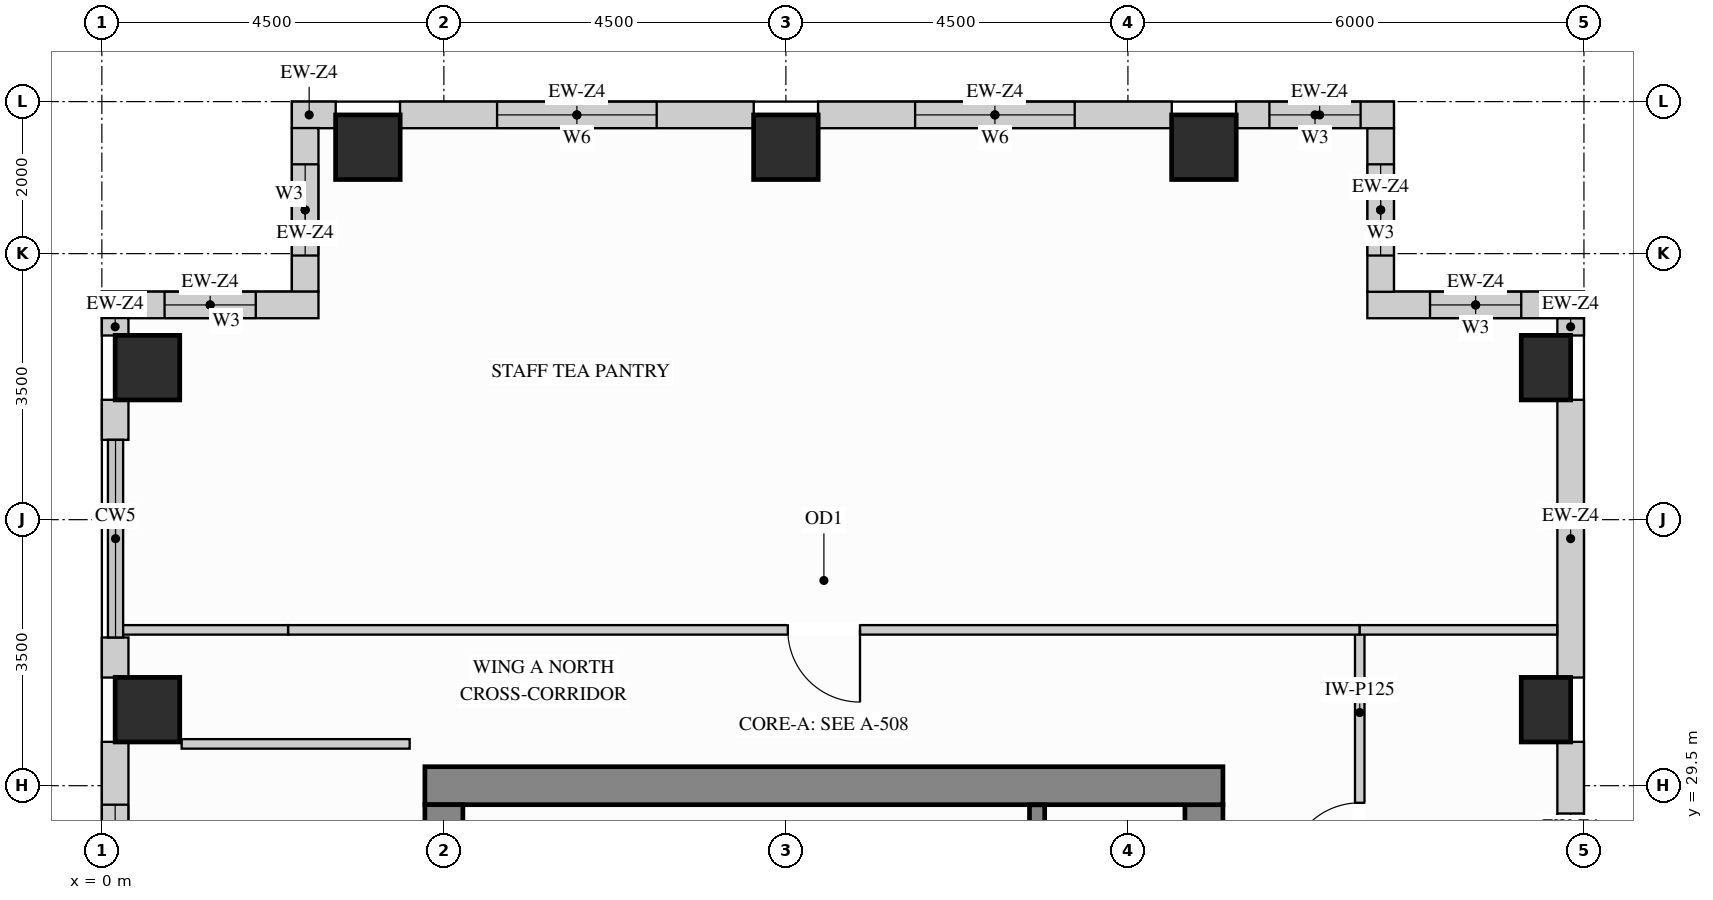
"""IFC4 building model, lengths in metres.
Left out: names, types, materials, properties, quantities, classifications, styles, units other than length and angle.
Written with IfcOpenShell. Run it as: python <this file> out.ifc"""

import sys

from ifc_helpers import new_model, si_unit, direction, frame, frame_2d, origin, origin_2d, place, context, subcontext, project, spatial, rectangle, extrude, source, transform, mapped, element, fill, save


model = new_model("IFC4")
c1 = context("Model", 3, precision=1e-05, world=origin(), true_north=direction((0.0, 1.0)))
c2 = subcontext(c1, "Body", "Model", "MODEL_VIEW")
j1 = project(units=[si_unit("LENGTHUNIT", "METRE"), si_unit("PLANEANGLEUNIT", "RADIAN")], contexts=[c1])
p1 = place(None, origin())
s1 = spatial("IfcSite", under=j1, at=p1, CompositionType="ELEMENT")
p2 = place(p1, origin())
s2 = spatial("IfcBuilding", under=s1, at=p2, CompositionType="ELEMENT")
p3 = place(p2, frame((0.0, 0.0, 255.6)))
s3 = spatial("IfcBuildingStorey", under=s2, at=p3, CompositionType="ELEMENT", Elevation=255.6)
m1 = source(origin(), c2, "Body", "SweptSolid", [
    extrude(rectangle(XDim=0.65, YDim=0.85, at=origin_2d()), origin(), (0.0, 0.0, 1.0), 3.4),
])
for number, where, z_axis, x_axis in (
    (1, (19.0, 30.5, 0.0), (0.0, 0.0, 1.0), (1.0, 0.0, 0.0)),
    (2, (19.0, 35.0, 0.0), (0.0, 0.0, 1.0), (1.0, 0.0, 0.0)),
):
    element("IfcColumn", number, at=place(p3, frame(where, z_axis=z_axis, x_axis=x_axis)), inside=s3, PredefinedType="COLUMN", context=c2, shape_type="MappedRepresentation", body=[
        mapped(m1, transform((0.0, 0.0, 0.0), x_axis=(1.0, 0.0, 0.0), y_axis=(0.0, 1.0, 0.0), z_axis=(0.0, 0.0, 1.0))),
    ])
m2 = source(origin(), c2, "Body", "SweptSolid", [
    extrude(rectangle(XDim=0.85, YDim=0.85, at=origin_2d()), origin(), (0.0, 0.0, 1.0), 3.4),
])
for number, where, z_axis, x_axis in (
    (3, (14.5, 37.9, 0.0), (0.0, 0.0, 1.0), (1.0, 0.0, 0.0)),
    (4, (3.5, 37.9, 0.0), (0.0, 0.0, 1.0), (1.0, 0.0, 0.0)),
    (5, (9.0, 37.9, 0.0), (0.0, 0.0, 1.0), (1.0, 0.0, 0.0)),
    (6, (0.6, 30.5, 0.0), (0.0, 0.0, 1.0), (1.0, 0.0, 0.0)),
    (7, (0.6, 35.0, 0.0), (0.0, 0.0, 1.0), (1.0, 0.0, 0.0)),
):
    element("IfcColumn", number, at=place(p3, frame(where, z_axis=z_axis, x_axis=x_axis)), inside=s3, PredefinedType="COLUMN", context=c2, shape_type="MappedRepresentation", body=[
        mapped(m2, transform((0.0, 0.0, 0.0), x_axis=(1.0, 0.0, 0.0), y_axis=(0.0, 1.0, 0.0), z_axis=(0.0, 0.0, 1.0))),
    ])
m3 = source(origin(), c2, "Body", "SweptSolid", [
    extrude(rectangle(XDim=8.37, YDim=0.5, at=frame_2d((4.185, 0.0))), origin(), (0.0, 0.0, 1.0), 3.4),
])
p4 = place(p3, frame((14.5, 20.88, 0.0), z_axis=(0.0, 0.0, 1.0), x_axis=(0.0, 1.0, 0.0)))
e8 = element("IfcWall", 8, at=p4, inside=s3, PredefinedType="SHEAR", context=c2, shape_type="MappedRepresentation", body=[
    mapped(m3, transform((0.0, 0.0, 0.0), x_axis=(1.0, 0.0, 0.0), y_axis=(0.0, 1.0, 0.0), z_axis=(0.0, 0.0, 1.0))),
])
m4 = source(origin(), c2, "Body", "SweptSolid", [
    extrude(rectangle(XDim=10.5, YDim=0.5, at=frame_2d((5.25, 0.0))), origin(), (0.0, 0.0, 1.0), 3.4),
])
p5 = place(p3, frame((4.25, 29.5, 0.0), z_axis=(0.0, 0.0, 1.0), x_axis=(1.0, 0.0, 0.0)))
e9 = element("IfcWall", 9, at=p5, inside=s3, PredefinedType="SHEAR", context=c2, shape_type="MappedRepresentation", body=[
    mapped(m4, transform((0.0, 0.0, 0.0), x_axis=(1.0, 0.0, 0.0), y_axis=(0.0, 1.0, 0.0), z_axis=(0.0, 0.0, 1.0))),
])
m5 = source(origin(), c2, "Body", "SweptSolid", [
    extrude(rectangle(XDim=20.5, YDim=0.5, at=frame_2d((10.25, 0.0))), origin(), (0.0, 0.0, 1.0), 3.4),
])
p6 = place(p3, frame((4.5, 8.75, 0.0), z_axis=(0.0, 0.0, 1.0), x_axis=(0.0, 1.0, 0.0)))
e10 = element("IfcWall", 10, at=p6, inside=s3, PredefinedType="SHEAR", context=c2, shape_type="MappedRepresentation", body=[
    mapped(m5, transform((0.0, 0.0, 0.0), x_axis=(1.0, 0.0, 0.0), y_axis=(0.0, 1.0, 0.0), z_axis=(0.0, 0.0, 1.0))),
])
p7 = place(p3, frame((19.325, 27.223, 0.0), z_axis=(0.0, 0.0, 1.0), x_axis=(0.0, 1.0, 0.0)))
e11 = element("IfcWall", 11, at=p7, inside=s3, PredefinedType="SOLIDWALL", context=c2, shape_type="SweptSolid", body=[
    extrude(rectangle(XDim=2.854, YDim=0.35, at=frame_2d((1.427, 0.0))), origin(), (0.0, 0.0, 1.0), 2.619),
])
p8 = place(p7, frame((0.411, 0.0, 0.78)))
e12 = element("IfcOpeningElement", 12, at=p8, cuts=e11, PredefinedType="OPENING", context=c2, shape_type="SweptSolid", body=[
    extrude(rectangle(XDim=1.5, YDim=1.659, at=frame_2d((0.75, 0.83))), frame((0.0, 0.185, 0.0), z_axis=(0.0, -1.0, 0.0), x_axis=(1.0, 0.0, 0.0)), (0.0, 0.0, 1.0), 0.37),
])
m6 = source(origin(), c2, "Body", "SweptSolid", [
    extrude(rectangle(XDim=3.654, YDim=0.35, at=frame_2d((1.827, 0.0))), origin(), (0.0, 0.0, 1.0), 2.619),
])
p9 = place(p3, frame((19.325, 30.923, 0.0), z_axis=(0.0, 0.0, 1.0), x_axis=(0.0, 1.0, 0.0)))
e13 = element("IfcWall", 13, at=p9, inside=s3, PredefinedType="SOLIDWALL", context=c2, shape_type="MappedRepresentation", body=[
    mapped(m6, transform((0.0, 0.0, 0.0), x_axis=(1.0, 0.0, 0.0), y_axis=(0.0, 1.0, 0.0), z_axis=(0.0, 0.0, 1.0))),
])
m7 = source(origin(), c2, "Body", "SweptSolid", [
    extrude(rectangle(XDim=0.229, YDim=0.35, at=frame_2d((0.115, 0.0))), origin(), (0.0, 0.0, 1.0), 3.385),
])
p10 = place(p3, frame((19.325, 35.423, 0.0), z_axis=(0.0, 0.0, 1.0), x_axis=(0.0, 1.0, 0.0)))
e14 = element("IfcWall", 14, at=p10, inside=s3, PredefinedType="SOLIDWALL", context=c2, shape_type="MappedRepresentation", body=[
    mapped(m7, transform((0.0, 0.0, 0.0), x_axis=(1.0, 0.0, 0.0), y_axis=(0.0, 1.0, 0.0), z_axis=(0.0, 0.0, 1.0))),
])
p11 = place(p3, frame((19.5, 35.825, 0.0), z_axis=(0.0, 0.0, 1.0), x_axis=(-1.0, 0.0, 0.0)))
e15 = element("IfcWall", 15, at=p11, inside=s3, PredefinedType="SOLIDWALL", context=c2, shape_type="SweptSolid", body=[
    extrude(rectangle(XDim=2.85, YDim=0.35, at=frame_2d((1.425, 0.0))), origin(), (0.0, 0.0, 1.0), 3.385),
])
p12 = place(p11, frame((0.825, 0.0, 0.78)))
e16 = element("IfcOpeningElement", 16, at=p12, cuts=e15, PredefinedType="OPENING", context=c2, shape_type="SweptSolid", body=[
    extrude(rectangle(XDim=1.2, YDim=2.25, at=frame_2d((0.6, 1.125))), frame((0.0, 0.185, 0.0), z_axis=(0.0, -1.0, 0.0), x_axis=(1.0, 0.0, 0.0)), (0.0, 0.0, 1.0), 0.37),
])
p13 = place(p3, frame((16.825, 35.998, 0.0), z_axis=(0.0, 0.0, 1.0), x_axis=(0.0, 1.0, 0.0)))
e17 = element("IfcWall", 17, at=p13, inside=s3, PredefinedType="SOLIDWALL", context=c2, shape_type="SweptSolid", body=[
    extrude(rectangle(XDim=2.154, YDim=0.35, at=frame_2d((1.077, 0.0))), origin(), (0.0, 0.0, 1.0), 3.385),
])
p14 = place(p13, frame((0.477, 0.0, 0.78)))
e18 = element("IfcOpeningElement", 18, at=p14, cuts=e17, PredefinedType="OPENING", context=c2, shape_type="SweptSolid", body=[
    extrude(rectangle(XDim=1.2, YDim=2.25, at=frame_2d((0.6, 1.125))), frame((0.0, 0.185, 0.0), z_axis=(0.0, -1.0, 0.0), x_axis=(1.0, 0.0, 0.0)), (0.0, 0.0, 1.0), 0.37),
])
p15 = place(p3, frame((17.0, 38.325, 0.0), z_axis=(0.0, 0.0, 1.0), x_axis=(-1.0, 0.0, 0.0)))
e19 = element("IfcWall", 19, at=p15, inside=s3, PredefinedType="SOLIDWALL", context=c2, shape_type="SweptSolid", body=[
    extrude(rectangle(XDim=2.077, YDim=0.35, at=frame_2d((1.039, 0.0))), origin(), (0.0, 0.0, 1.0), 3.385),
])
p16 = place(p15, frame((0.438, 0.0, 0.78)))
e20 = element("IfcOpeningElement", 20, at=p16, cuts=e19, PredefinedType="OPENING", context=c2, shape_type="SweptSolid", body=[
    extrude(rectangle(XDim=1.2, YDim=2.25, at=frame_2d((0.6, 1.125))), frame((0.0, 0.185, 0.0), z_axis=(0.0, -1.0, 0.0), x_axis=(1.0, 0.0, 0.0)), (0.0, 0.0, 1.0), 0.37),
])
p17 = place(p3, frame((14.077, 38.325, 0.0), z_axis=(0.0, 0.0, 1.0), x_axis=(-1.0, 0.0, 0.0)))
e21 = element("IfcWall", 21, at=p17, inside=s3, PredefinedType="SOLIDWALL", context=c2, shape_type="SweptSolid", body=[
    extrude(rectangle(XDim=4.654, YDim=0.35, at=frame_2d((2.327, 0.0))), origin(), (0.0, 0.0, 1.0), 3.385),
])
p18 = place(p17, frame((1.277, 0.0, 0.78)))
e22 = element("IfcOpeningElement", 22, at=p18, cuts=e21, PredefinedType="OPENING", context=c2, shape_type="SweptSolid", body=[
    extrude(rectangle(XDim=2.1, YDim=2.25, at=frame_2d((1.05, 1.125))), frame((0.0, 0.185, 0.0), z_axis=(0.0, -1.0, 0.0), x_axis=(1.0, 0.0, 0.0)), (0.0, 0.0, 1.0), 0.37),
])
p19 = place(p3, frame((8.577, 38.325, 0.0), z_axis=(0.0, 0.0, 1.0), x_axis=(-1.0, 0.0, 0.0)))
e23 = element("IfcWall", 23, at=p19, inside=s3, PredefinedType="SOLIDWALL", context=c2, shape_type="SweptSolid", body=[
    extrude(rectangle(XDim=4.654, YDim=0.35, at=frame_2d((2.327, 0.0))), origin(), (0.0, 0.0, 1.0), 3.385),
])
p20 = place(p19, frame((1.277, 0.0, 0.78)))
e24 = element("IfcOpeningElement", 24, at=p20, cuts=e23, PredefinedType="OPENING", context=c2, shape_type="SweptSolid", body=[
    extrude(rectangle(XDim=2.1, YDim=2.25, at=frame_2d((1.05, 1.125))), frame((0.0, 0.185, 0.0), z_axis=(0.0, -1.0, 0.0), x_axis=(1.0, 0.0, 0.0)), (0.0, 0.0, 1.0), 0.37),
])
m8 = source(origin(), c2, "Body", "SweptSolid", [
    extrude(rectangle(XDim=0.577, YDim=0.35, at=frame_2d((0.289, 0.0))), origin(), (0.0, 0.0, 1.0), 3.385),
])
p21 = place(p3, frame((3.077, 38.325, 0.0), z_axis=(0.0, 0.0, 1.0), x_axis=(-1.0, 0.0, 0.0)))
e25 = element("IfcWall", 25, at=p21, inside=s3, PredefinedType="SOLIDWALL", context=c2, shape_type="MappedRepresentation", body=[
    mapped(m8, transform((0.0, 0.0, 0.0), x_axis=(1.0, 0.0, 0.0), y_axis=(0.0, 1.0, 0.0), z_axis=(0.0, 0.0, 1.0))),
])
p22 = place(p3, frame((2.675, 38.152, 0.0), z_axis=(0.0, 0.0, 1.0), x_axis=(0.0, -1.0, 0.0)))
e26 = element("IfcWall", 26, at=p22, inside=s3, PredefinedType="SOLIDWALL", context=c2, shape_type="SweptSolid", body=[
    extrude(rectangle(XDim=2.154, YDim=0.35, at=frame_2d((1.077, 0.0))), origin(), (0.0, 0.0, 1.0), 3.385),
])
p23 = place(p22, frame((0.477, 0.0, 0.78)))
e27 = element("IfcOpeningElement", 27, at=p23, cuts=e26, PredefinedType="OPENING", context=c2, shape_type="SweptSolid", body=[
    extrude(rectangle(XDim=1.2, YDim=2.25, at=frame_2d((0.6, 1.125))), frame((0.0, 0.185, 0.0), z_axis=(0.0, -1.0, 0.0), x_axis=(1.0, 0.0, 0.0)), (0.0, 0.0, 1.0), 0.37),
])
p24 = place(p3, frame((2.85, 35.825, 0.0), z_axis=(0.0, 0.0, 1.0), x_axis=(-1.0, 0.0, 0.0)))
e28 = element("IfcWall", 28, at=p24, inside=s3, PredefinedType="SOLIDWALL", context=c2, shape_type="SweptSolid", body=[
    extrude(rectangle(XDim=2.85, YDim=0.35, at=frame_2d((1.425, 0.0))), origin(), (0.0, 0.0, 1.0), 3.385),
])
p25 = place(p24, frame((0.825, 0.0, 0.78)))
e29 = element("IfcOpeningElement", 29, at=p25, cuts=e28, PredefinedType="OPENING", context=c2, shape_type="SweptSolid", body=[
    extrude(rectangle(XDim=1.2, YDim=2.25, at=frame_2d((0.6, 1.125))), frame((0.0, 0.185, 0.0), z_axis=(0.0, -1.0, 0.0), x_axis=(1.0, 0.0, 0.0)), (0.0, 0.0, 1.0), 0.37),
])
p26 = place(p3, frame((0.175, 35.652, 0.0), z_axis=(0.0, 0.0, 1.0), x_axis=(0.0, -1.0, 0.0)))
e30 = element("IfcWall", 30, at=p26, inside=s3, PredefinedType="SOLIDWALL", context=c2, shape_type="MappedRepresentation", body=[
    mapped(m7, transform((0.0, 0.0, 0.0), x_axis=(1.0, 0.0, 0.0), y_axis=(0.0, 1.0, 0.0), z_axis=(0.0, 0.0, 1.0))),
])
m9 = source(origin(), c2, "Body", "SweptSolid", [
    extrude(rectangle(XDim=0.527, YDim=0.35, at=frame_2d((0.263, 0.0))), origin(), (0.0, 0.0, 1.0), 3.385),
])
for number, where, z_axis, x_axis in (
    (31, (0.175, 34.577, 0.0), (0.0, 0.0, 1.0), (0.0, -1.0, 0.0)),
    (32, (0.175, 31.45, 0.0), (0.0, 0.0, 1.0), (0.0, -1.0, 0.0)),
):
    element("IfcWall", number, at=place(p3, frame(where, z_axis=z_axis, x_axis=x_axis)), inside=s3, PredefinedType="SOLIDWALL", context=c2, shape_type="MappedRepresentation", body=[
        mapped(m9, transform((0.0, 0.0, 0.0), x_axis=(1.0, 0.0, 0.0), y_axis=(0.0, 1.0, 0.0), z_axis=(0.0, 0.0, 1.0))),
    ])
p27 = place(p3, frame((0.175, 30.077, 0.0), z_axis=(0.0, 0.0, 1.0), x_axis=(0.0, -1.0, 0.0)))
e33 = element("IfcWall", 33, at=p27, inside=s3, PredefinedType="SOLIDWALL", context=c2, shape_type="SweptSolid", body=[
    extrude(rectangle(XDim=2.854, YDim=0.35, at=frame_2d((1.427, 0.0))), origin(), (0.0, 0.0, 1.0), 3.385),
])
p28 = place(p27, frame((0.827, 0.0, 0.78)))
e34 = element("IfcOpeningElement", 34, at=p28, cuts=e33, PredefinedType="OPENING", context=c2, shape_type="SweptSolid", body=[
    extrude(rectangle(XDim=1.2, YDim=2.25, at=frame_2d((0.6, 1.125))), frame((0.0, 0.185, 0.0), z_axis=(0.0, -1.0, 0.0), x_axis=(1.0, 0.0, 0.0)), (0.0, 0.0, 1.0), 0.37),
])
p29 = place(p3, frame((16.55, 26.05, 0.0), z_axis=(0.0, 0.0, 1.0), x_axis=(0.0, 1.0, 0.0)))
e35 = element("IfcWall", 35, at=p29, inside=s3, PredefinedType="PARTITIONING", context=c2, shape_type="SweptSolid", body=[
    extrude(rectangle(XDim=5.5, YDim=0.125, at=frame_2d((2.75, 0.0))), origin(), (0.0, 0.0, 1.0), 3.385),
])
p30 = place(p29, frame((2.275, 0.0, 0.0)))
e36 = element("IfcOpeningElement", 36, at=p30, cuts=e35, PredefinedType="OPENING", context=c2, shape_type="SweptSolid", body=[
    extrude(rectangle(XDim=0.95, YDim=2.15, at=frame_2d((0.475, 1.075))), frame((0.0, 0.073, 0.0), z_axis=(0.0, -1.0, 0.0), x_axis=(1.0, 0.0, 0.0)), (0.0, 0.0, 1.0), 0.145),
])
p31 = place(p3, frame((2.45, 31.55, 0.0), z_axis=(0.0, 0.0, 1.0), x_axis=(1.0, 0.0, 0.0)))
e37 = element("IfcWall", 37, at=p31, inside=s3, PredefinedType="PARTITIONING", context=c2, shape_type="SweptSolid", body=[
    extrude(rectangle(XDim=14.1, YDim=0.125, at=frame_2d((7.05, 0.0))), origin(), (0.0, 0.0, 1.0), 3.385),
])
p32 = place(p31, frame((6.575, 0.0, 0.0)))
e38 = element("IfcOpeningElement", 38, at=p32, cuts=e37, PredefinedType="OPENING", context=c2, shape_type="SweptSolid", body=[
    extrude(rectangle(XDim=0.95, YDim=2.15, at=frame_2d((0.475, 1.075))), frame((0.0, 0.073, 0.0), z_axis=(0.0, -1.0, 0.0), x_axis=(1.0, 0.0, 0.0)), (0.0, 0.0, 1.0), 0.145),
])
m10 = source(origin(), c2, "Body", "SweptSolid", [
    extrude(rectangle(XDim=2.598, YDim=0.125, at=frame_2d((1.299, 0.0))), origin(), (0.0, 0.0, 1.0), 3.385),
])
p33 = place(p3, frame((16.55, 31.55, 0.0), z_axis=(0.0, 0.0, 1.0), x_axis=(1.0, 0.0, 0.0)))
e39 = element("IfcWall", 39, at=p33, inside=s3, PredefinedType="PARTITIONING", context=c2, shape_type="MappedRepresentation", body=[
    mapped(m10, transform((0.0, 0.0, 0.0), x_axis=(1.0, 0.0, 0.0), y_axis=(0.0, 1.0, 0.0), z_axis=(0.0, 0.0, 1.0))),
])
m11 = source(origin(), c2, "Body", "SweptSolid", [
    extrude(rectangle(XDim=2.24, YDim=0.125, at=frame_2d((1.12, 0.0))), origin(), (0.0, 0.0, 1.0), 3.385),
])
p34 = place(p3, frame((0.21, 31.55, 0.0), z_axis=(0.0, 0.0, 1.0), x_axis=(1.0, 0.0, 0.0)))
e40 = element("IfcWall", 40, at=p34, inside=s3, PredefinedType="PARTITIONING", context=c2, shape_type="MappedRepresentation", body=[
    mapped(m11, transform((0.0, 0.0, 0.0), x_axis=(1.0, 0.0, 0.0), y_axis=(0.0, 1.0, 0.0), z_axis=(0.0, 0.0, 1.0))),
])
m12 = source(origin(), c2, "Body", "SweptSolid", [
    extrude(rectangle(XDim=3.0, YDim=0.125, at=frame_2d((1.5, 0.0))), origin(), (0.0, 0.0, 1.0), 3.385),
])
p35 = place(p3, frame((1.05, 30.05, 0.0), z_axis=(0.0, 0.0, 1.0), x_axis=(1.0, 0.0, 0.0)))
e41 = element("IfcWall", 41, at=p35, inside=s3, PredefinedType="PARTITIONING", context=c2, shape_type="MappedRepresentation", body=[
    mapped(m12, transform((0.0, 0.0, 0.0), x_axis=(1.0, 0.0, 0.0), y_axis=(0.0, 1.0, 0.0), z_axis=(0.0, 0.0, 1.0))),
])
m13 = source(origin(), c2, "Body", "SweptSolid", [
    extrude(rectangle(XDim=3.803, YDim=0.2, at=frame_2d((1.901, 0.0))), origin(), (0.0, 0.0, 1.0), 3.4),
])
p36 = place(p3, frame((12.305, 25.445, 0.0), z_axis=(0.0, 0.0, 1.0), x_axis=(0.0, 1.0, 0.0)))
e42 = element("IfcWall", 42, at=p36, inside=s3, PredefinedType="SHEAR", context=c2, shape_type="MappedRepresentation", body=[
    mapped(m13, transform((0.0, 0.0, 0.0), x_axis=(1.0, 0.0, 0.0), y_axis=(0.0, 1.0, 0.0), z_axis=(0.0, 0.0, 1.0))),
])
m14 = source(origin(), c2, "Body", "SweptSolid", [
    extrude(rectangle(XDim=0.95, YDim=2.15, at=frame_2d((0.475, 1.075))), frame((0.0, 0.025, 0.0), z_axis=(0.0, -1.0, 0.0), x_axis=(1.0, 0.0, 0.0)), (0.0, 0.0, 1.0), 0.05),
])
p37 = place(p30, origin())
e43 = element("IfcDoor", 43, at=p37, inside=s3, OperationType="SINGLE_SWING_LEFT", PredefinedType="DOOR", context=c2, shape_type="MappedRepresentation", body=[
    mapped(m14, transform((0.0, 0.0, 0.0), x_axis=(1.0, 0.0, 0.0), y_axis=(0.0, 1.0, 0.0), z_axis=(0.0, 0.0, 1.0))),
])
fill(e36, e43)
p38 = place(p32, origin())
e44 = element("IfcDoor", 44, at=p38, inside=s3, OperationType="SINGLE_SWING_RIGHT", PredefinedType="DOOR", context=c2, shape_type="MappedRepresentation", body=[
    mapped(m14, transform((0.0, 0.0, 0.0), x_axis=(1.0, 0.0, 0.0), y_axis=(0.0, 1.0, 0.0), z_axis=(0.0, 0.0, 1.0))),
])
fill(e38, e44)
m15 = source(origin(), c2, "Body", "SweptSolid", [
    extrude(rectangle(XDim=1.2, YDim=2.25, at=frame_2d((0.6, 1.125))), frame((0.0, 0.03, 0.0), z_axis=(0.0, -1.0, 0.0), x_axis=(1.0, 0.0, 0.0)), (0.0, 0.0, 1.0), 0.06),
])
p39 = place(p12, origin())
e45 = element("IfcWindow", 45, at=p39, inside=s3, PartitioningType="SINGLE_PANEL", PredefinedType="WINDOW", context=c2, shape_type="MappedRepresentation", body=[
    mapped(m15, transform((0.0, 0.0, 0.0), x_axis=(1.0, 0.0, 0.0), y_axis=(0.0, 1.0, 0.0), z_axis=(0.0, 0.0, 1.0))),
])
fill(e16, e45)
p40 = place(p14, origin())
e46 = element("IfcWindow", 46, at=p40, inside=s3, PartitioningType="SINGLE_PANEL", PredefinedType="WINDOW", context=c2, shape_type="MappedRepresentation", body=[
    mapped(m15, transform((0.0, 0.0, 0.0), x_axis=(1.0, 0.0, 0.0), y_axis=(0.0, 1.0, 0.0), z_axis=(0.0, 0.0, 1.0))),
])
fill(e18, e46)
p41 = place(p16, origin())
e47 = element("IfcWindow", 47, at=p41, inside=s3, PartitioningType="SINGLE_PANEL", PredefinedType="WINDOW", context=c2, shape_type="MappedRepresentation", body=[
    mapped(m15, transform((0.0, 0.0, 0.0), x_axis=(1.0, 0.0, 0.0), y_axis=(0.0, 1.0, 0.0), z_axis=(0.0, 0.0, 1.0))),
])
fill(e20, e47)
p42 = place(p23, origin())
e48 = element("IfcWindow", 48, at=p42, inside=s3, PartitioningType="SINGLE_PANEL", PredefinedType="WINDOW", context=c2, shape_type="MappedRepresentation", body=[
    mapped(m15, transform((0.0, 0.0, 0.0), x_axis=(1.0, 0.0, 0.0), y_axis=(0.0, 1.0, 0.0), z_axis=(0.0, 0.0, 1.0))),
])
fill(e27, e48)
p43 = place(p25, origin())
e49 = element("IfcWindow", 49, at=p43, inside=s3, PartitioningType="SINGLE_PANEL", PredefinedType="WINDOW", context=c2, shape_type="MappedRepresentation", body=[
    mapped(m15, transform((0.0, 0.0, 0.0), x_axis=(1.0, 0.0, 0.0), y_axis=(0.0, 1.0, 0.0), z_axis=(0.0, 0.0, 1.0))),
])
fill(e29, e49)
p44 = place(p28, origin())
e50 = element("IfcWindow", 50, at=p44, inside=s3, PartitioningType="SINGLE_PANEL", PredefinedType="WINDOW", context=c2, shape_type="MappedRepresentation", body=[
    mapped(m15, transform((0.0, 0.0, 0.0), x_axis=(1.0, 0.0, 0.0), y_axis=(0.0, 1.0, 0.0), z_axis=(0.0, 0.0, 1.0))),
])
fill(e34, e50)
m16 = source(origin(), c2, "Body", "SweptSolid", [
    extrude(rectangle(XDim=1.5, YDim=1.659, at=frame_2d((0.75, 0.83))), frame((0.0, 0.03, 0.0), z_axis=(0.0, -1.0, 0.0), x_axis=(1.0, 0.0, 0.0)), (0.0, 0.0, 1.0), 0.06),
])
p45 = place(p8, origin())
e51 = element("IfcWindow", 51, at=p45, inside=s3, PartitioningType="SINGLE_PANEL", PredefinedType="WINDOW", context=c2, shape_type="MappedRepresentation", body=[
    mapped(m16, transform((0.0, 0.0, 0.0), x_axis=(1.0, 0.0, 0.0), y_axis=(0.0, 1.0, 0.0), z_axis=(0.0, 0.0, 1.0))),
])
fill(e12, e51)
m17 = source(origin(), c2, "Body", "SweptSolid", [
    extrude(rectangle(XDim=2.1, YDim=2.25, at=frame_2d((1.05, 1.125))), frame((0.0, 0.03, 0.0), z_axis=(0.0, -1.0, 0.0), x_axis=(1.0, 0.0, 0.0)), (0.0, 0.0, 1.0), 0.06),
])
p46 = place(p18, origin())
e52 = element("IfcWindow", 52, at=p46, inside=s3, PartitioningType="SINGLE_PANEL", PredefinedType="WINDOW", context=c2, shape_type="MappedRepresentation", body=[
    mapped(m17, transform((0.0, 0.0, 0.0), x_axis=(1.0, 0.0, 0.0), y_axis=(0.0, 1.0, 0.0), z_axis=(0.0, 0.0, 1.0))),
])
fill(e22, e52)
p47 = place(p20, origin())
e53 = element("IfcWindow", 53, at=p47, inside=s3, PartitioningType="SINGLE_PANEL", PredefinedType="WINDOW", context=c2, shape_type="MappedRepresentation", body=[
    mapped(m17, transform((0.0, 0.0, 0.0), x_axis=(1.0, 0.0, 0.0), y_axis=(0.0, 1.0, 0.0), z_axis=(0.0, 0.0, 1.0))),
])
fill(e24, e53)
save(model, sys.argv[1])
